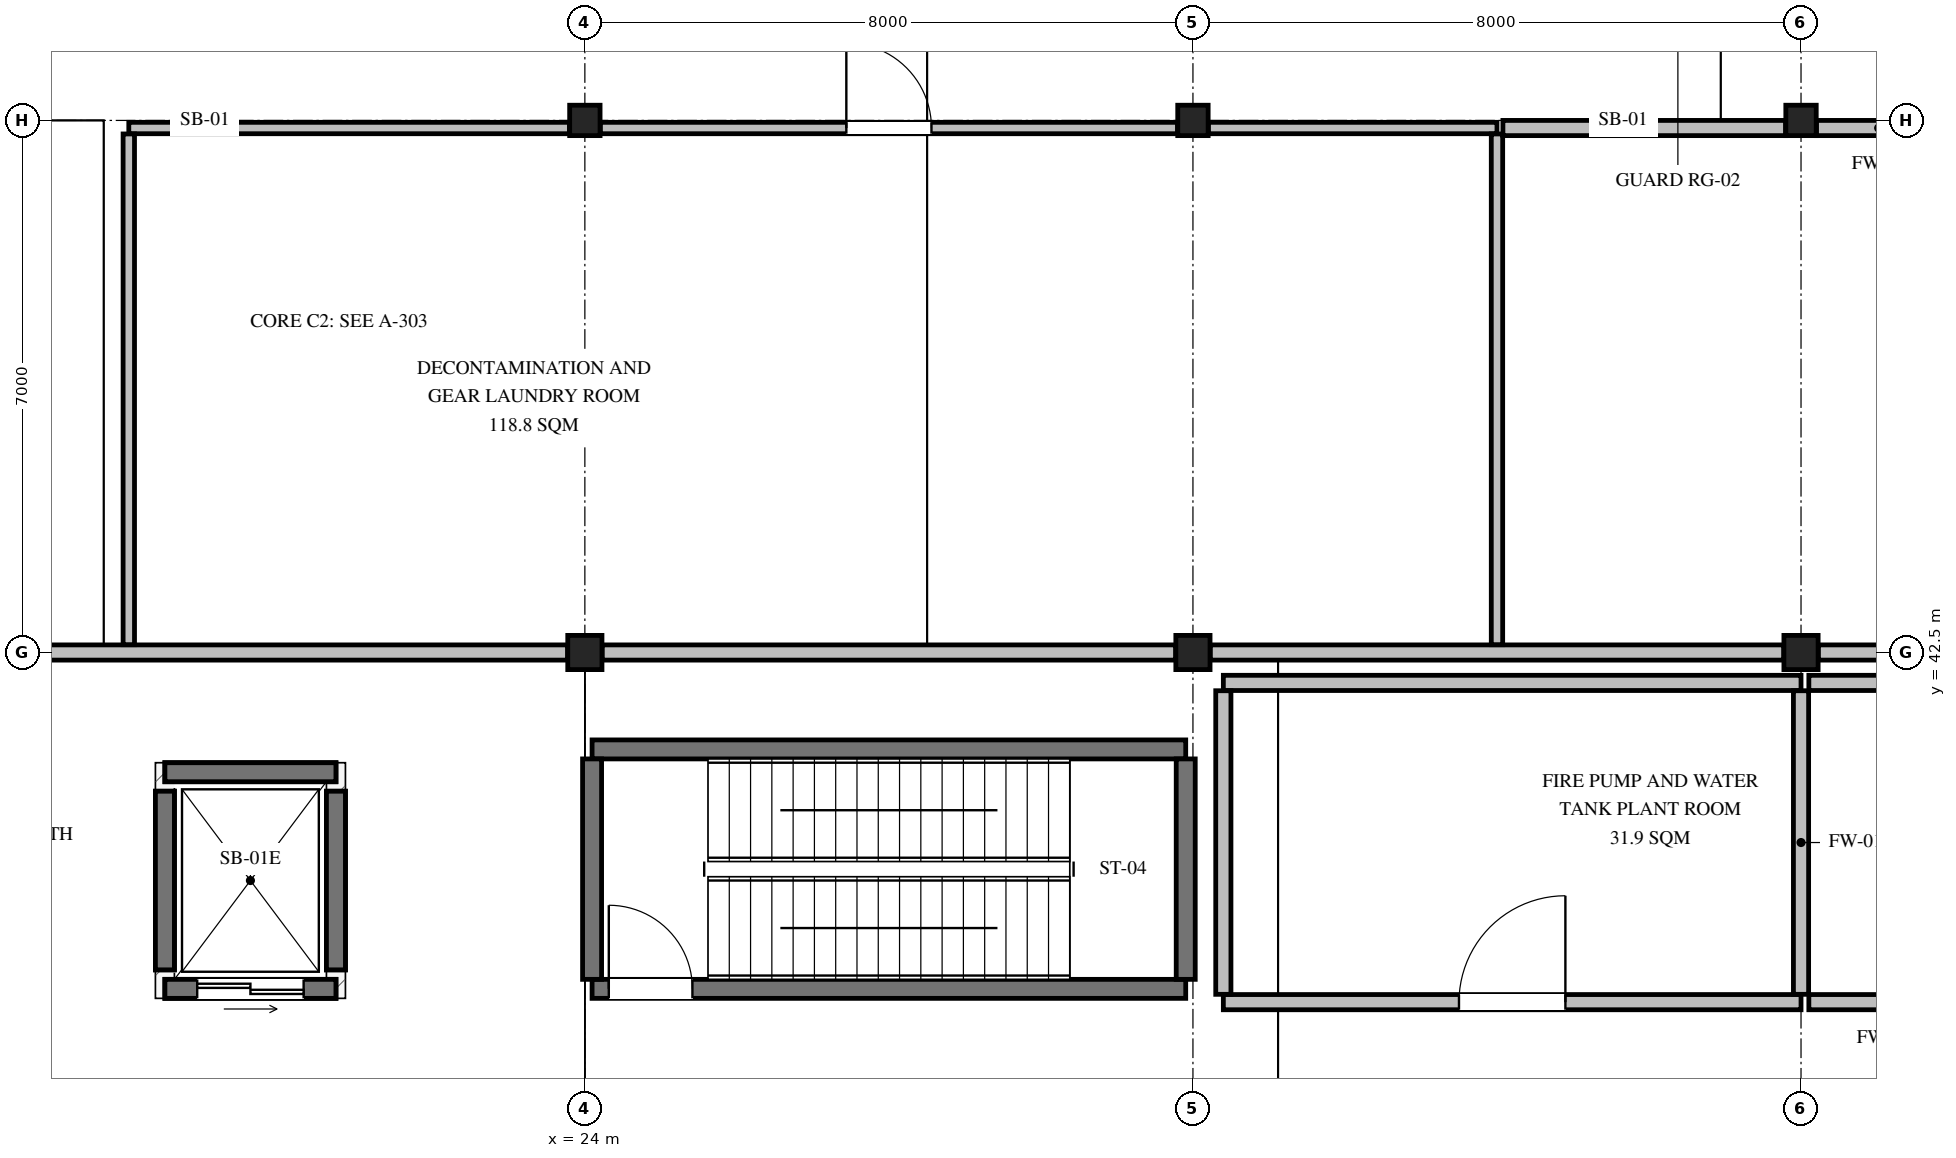
"""IFC4 building model, lengths in metres.
Left out: names, types, materials, properties, quantities, classifications, styles, units other than length and angle.
Written with IfcOpenShell. Run it as: python <this file> out.ifc"""

import sys

from ifc_helpers import new_model, si_unit, direction, frame, frame_2d, origin, origin_2d, place, context, subcontext, project, spatial, rectangle, hollow_rectangle, i_section, extrude, element, fill, save


model = new_model("IFC4")
c1 = context("Model", 3, precision=1e-05, world=origin(), true_north=direction((0.0, 1.0)))
c2 = subcontext(c1, "Body", "Model", "MODEL_VIEW")
j1 = project(units=[si_unit("LENGTHUNIT", "METRE"), si_unit("PLANEANGLEUNIT", "RADIAN")], contexts=[c1])
p1 = place(None, origin())
s1 = spatial("IfcSite", under=j1, at=p1, CompositionType="ELEMENT")
p2 = place(p1, origin())
s2 = spatial("IfcBuilding", under=s1, at=p2, CompositionType="ELEMENT")
p3 = place(p2, frame((0.0, 0.0, 0.45)))
s3 = spatial("IfcBuildingStorey", under=s2, at=p3, CompositionType="ELEMENT", Elevation=0.45)
p4 = place(p3, frame((24.0, 42.5, -0.45), z_axis=(0.0, 0.0, 1.0), x_axis=(1.0, 0.0, 0.0)))
e1 = element("IfcColumn", 1, at=p4, inside=s3, PredefinedType="COLUMN", context=c2, shape_type="SweptSolid", body=[
    extrude(hollow_rectangle(XDim=0.45, YDim=0.45, WallThickness=0.022, at=origin_2d()), origin(), (0.0, 0.0, 1.0), 5.85),
])
p5 = place(p3, frame((24.0, 49.5, -0.45), z_axis=(0.0, 0.0, 1.0), x_axis=(1.0, 0.0, 0.0)))
e2 = element("IfcColumn", 2, at=p5, inside=s3, PredefinedType="COLUMN", context=c2, shape_type="SweptSolid", body=[
    extrude(i_section(OverallWidth=0.4, OverallDepth=0.4, WebThickness=0.013, FlangeThickness=0.021, FilletRadius=0.022, at=origin_2d()), origin(), (0.0, 0.0, 1.0), 5.85),
])
p6 = place(p3, frame((32.0, 42.5, -0.45), z_axis=(0.0, 0.0, 1.0), x_axis=(1.0, 0.0, 0.0)))
e3 = element("IfcColumn", 3, at=p6, inside=s3, PredefinedType="COLUMN", context=c2, shape_type="SweptSolid", body=[
    extrude(hollow_rectangle(XDim=0.45, YDim=0.45, WallThickness=0.022, at=origin_2d()), origin(), (0.0, 0.0, 1.0), 5.85),
])
p7 = place(p3, frame((32.0, 49.5, -0.45), z_axis=(0.0, 0.0, 1.0), x_axis=(1.0, 0.0, 0.0)))
e4 = element("IfcColumn", 4, at=p7, inside=s3, PredefinedType="COLUMN", context=c2, shape_type="SweptSolid", body=[
    extrude(i_section(OverallWidth=0.4, OverallDepth=0.4, WebThickness=0.013, FlangeThickness=0.021, FilletRadius=0.022, at=origin_2d()), origin(), (0.0, 0.0, 1.0), 5.85),
])
p8 = place(p3, frame((40.0, 42.5, -0.45), z_axis=(0.0, 0.0, 1.0), x_axis=(1.0, 0.0, 0.0)))
e5 = element("IfcColumn", 5, at=p8, inside=s3, PredefinedType="COLUMN", context=c2, shape_type="SweptSolid", body=[
    extrude(hollow_rectangle(XDim=0.45, YDim=0.45, WallThickness=0.022, at=origin_2d()), origin(), (0.0, 0.0, 1.0), 5.85),
])
p9 = place(p3, frame((40.0, 49.5, -0.45), z_axis=(0.0, 0.0, 1.0), x_axis=(1.0, 0.0, 0.0)))
e6 = element("IfcColumn", 6, at=p9, inside=s3, PredefinedType="COLUMN", context=c2, shape_type="SweptSolid", body=[
    extrude(i_section(OverallWidth=0.4, OverallDepth=0.4, WebThickness=0.013, FlangeThickness=0.021, FilletRadius=0.022, at=origin_2d()), origin(), (0.0, 0.0, 1.0), 5.85),
])
p10 = place(p3, frame((24.095, 38.075, 0.0), z_axis=(0.0, 0.0, 1.0), x_axis=(1.0, 0.0, 0.0)))
e7 = element("IfcWall", 7, at=p10, inside=s3, PredefinedType="SHEAR", context=c2, shape_type="SweptSolid", body=[
    extrude(rectangle(XDim=7.81, YDim=0.25, at=frame_2d((3.905, 0.0))), origin(), (0.0, 0.0, 1.0), 5.16),
])
p11 = place(p10, frame((0.22, 0.0, 0.0)))
e8 = element("IfcOpeningElement", 8, at=p11, cuts=e7, PredefinedType="OPENING", context=c2, shape_type="SweptSolid", body=[
    extrude(rectangle(XDim=1.1, YDim=2.15, at=frame_2d((0.55, 1.075))), frame((0.0, 0.135, 0.0), z_axis=(0.0, -1.0, 0.0), x_axis=(1.0, 0.0, 0.0)), (0.0, 0.0, 1.0), 0.27),
])
p12 = place(p3, frame((24.095, 41.225, 0.0), z_axis=(0.0, 0.0, 1.0), x_axis=(1.0, 0.0, 0.0)))
e9 = element("IfcWall", 9, at=p12, inside=s3, PredefinedType="SHEAR", context=c2, shape_type="SweptSolid", body=[
    extrude(rectangle(XDim=7.81, YDim=0.25, at=frame_2d((3.905, 0.0))), origin(), (0.0, 0.0, 1.0), 5.16),
])
for number, where, z_axis, x_axis in (
    (10, (24.095, 38.2, 0.0), (0.0, 0.0, 1.0), (0.0, 1.0, 0.0)),
    (11, (31.905, 38.2, 0.0), (0.0, 0.0, 1.0), (0.0, 1.0, 0.0)),
):
    element("IfcWall", number, at=place(p3, frame(where, z_axis=z_axis, x_axis=x_axis)), inside=s3, PredefinedType="SHEAR", context=c2, shape_type="SweptSolid", body=[
        extrude(rectangle(XDim=2.9, YDim=0.25, at=frame_2d((1.45, 0.0))), origin(), (0.0, 0.0, 1.0), 5.16),
    ])
for number, where, z_axis, x_axis in (
    (12, (18.475, 38.075, -1.65), (0.0, 0.0, 1.0), (1.0, 0.0, 0.0)),
    (13, (18.475, 40.925, -1.65), (0.0, 0.0, 1.0), (1.0, 0.0, 0.0)),
):
    element("IfcWall", number, at=place(p3, frame(where, z_axis=z_axis, x_axis=x_axis)), inside=s3, PredefinedType="SHEAR", context=c2, shape_type="SweptSolid", body=[
        extrude(rectangle(XDim=2.25, YDim=0.25, at=frame_2d((1.125, 0.0))), origin(), (0.0, 0.0, 1.0), 1.65),
    ])
for number, where, z_axis, x_axis in (
    (14, (18.475, 38.325, -1.65), (0.0, 0.0, 1.0), (0.0, 1.0, 0.0)),
    (15, (20.725, 38.325, -1.65), (0.0, 0.0, 1.0), (0.0, 1.0, 0.0)),
):
    element("IfcWall", number, at=place(p3, frame(where, z_axis=z_axis, x_axis=x_axis)), inside=s3, PredefinedType="SHEAR", context=c2, shape_type="SweptSolid", body=[
        extrude(rectangle(XDim=2.35, YDim=0.25, at=frame_2d((1.175, 0.0))), origin(), (0.0, 0.0, 1.0), 1.65),
    ])
p13 = place(p3, frame((18.475, 38.075, 0.0), z_axis=(0.0, 0.0, 1.0), x_axis=(1.0, 0.0, 0.0)))
e16 = element("IfcWall", 16, at=p13, inside=s3, PredefinedType="SHEAR", context=c2, shape_type="SweptSolid", body=[
    extrude(rectangle(XDim=2.25, YDim=0.25, at=frame_2d((1.125, 0.0))), origin(), (0.0, 0.0, 1.0), 5.16),
])
p14 = place(p13, frame((0.425, 0.0, 0.0)))
e17 = element("IfcOpeningElement", 17, at=p14, cuts=e16, PredefinedType="OPENING", context=c2, shape_type="SweptSolid", body=[
    extrude(rectangle(XDim=1.4, YDim=2.2, at=frame_2d((0.7, 1.1))), frame((0.0, 0.135, 0.0), z_axis=(0.0, -1.0, 0.0), x_axis=(1.0, 0.0, 0.0)), (0.0, 0.0, 1.0), 0.27),
])
p15 = place(p3, frame((18.475, 40.925, 0.0), z_axis=(0.0, 0.0, 1.0), x_axis=(1.0, 0.0, 0.0)))
e18 = element("IfcWall", 18, at=p15, inside=s3, PredefinedType="SHEAR", context=c2, shape_type="SweptSolid", body=[
    extrude(rectangle(XDim=2.25, YDim=0.25, at=frame_2d((1.125, 0.0))), origin(), (0.0, 0.0, 1.0), 5.16),
])
for number, where, z_axis, x_axis in (
    (19, (18.475, 38.325, 0.0), (0.0, 0.0, 1.0), (0.0, 1.0, 0.0)),
    (20, (20.725, 38.325, 0.0), (0.0, 0.0, 1.0), (0.0, 1.0, 0.0)),
):
    element("IfcWall", number, at=place(p3, frame(where, z_axis=z_axis, x_axis=x_axis)), inside=s3, PredefinedType="SHEAR", context=c2, shape_type="SweptSolid", body=[
        extrude(rectangle(XDim=2.35, YDim=0.25, at=frame_2d((1.175, 0.0))), origin(), (0.0, 0.0, 1.0), 5.16),
    ])
p16 = place(p3, frame((16.227, 42.5, 0.0), z_axis=(0.0, 0.0, 1.0), x_axis=(1.0, 0.0, 0.0)))
e21 = element("IfcWall", 21, at=p16, inside=s3, PredefinedType="PARTITIONING", context=c2, shape_type="SweptSolid", body=[
    extrude(rectangle(XDim=7.546, YDim=0.2, at=frame_2d((3.773, 0.0))), origin(), (0.0, 0.0, 1.0), 4.654),
])
p17 = place(p3, frame((24.227, 42.5, 0.0), z_axis=(0.0, 0.0, 1.0), x_axis=(1.0, 0.0, 0.0)))
e22 = element("IfcWall", 22, at=p17, inside=s3, PredefinedType="PARTITIONING", context=c2, shape_type="SweptSolid", body=[
    extrude(rectangle(XDim=7.546, YDim=0.2, at=frame_2d((3.773, 0.0))), origin(), (0.0, 0.0, 1.0), 4.704),
])
p18 = place(p3, frame((32.227, 42.5, 0.0), z_axis=(0.0, 0.0, 1.0), x_axis=(1.0, 0.0, 0.0)))
e23 = element("IfcWall", 23, at=p18, inside=s3, PredefinedType="PARTITIONING", context=c2, shape_type="SweptSolid", body=[
    extrude(rectangle(XDim=7.546, YDim=0.2, at=frame_2d((3.773, 0.0))), origin(), (0.0, 0.0, 1.0), 4.654),
])
p19 = place(p3, frame((40.227, 42.5, 0.0), z_axis=(0.0, 0.0, 1.0), x_axis=(1.0, 0.0, 0.0)))
e24 = element("IfcWall", 24, at=p19, inside=s3, PredefinedType="PARTITIONING", context=c2, shape_type="SweptSolid", body=[
    extrude(rectangle(XDim=7.546, YDim=0.2, at=frame_2d((3.773, 0.0))), origin(), (0.0, 0.0, 1.0), 4.754),
])
p20 = place(p3, frame((32.4, 37.9, 0.0), z_axis=(0.0, 0.0, 1.0), x_axis=(1.0, 0.0, 0.0)))
e25 = element("IfcWall", 25, at=p20, inside=s3, PredefinedType="PARTITIONING", context=c2, shape_type="SweptSolid", body=[
    extrude(rectangle(XDim=7.6, YDim=0.2, at=frame_2d((3.8, 0.0))), origin(), (0.0, 0.0, 1.0), 5.16),
])
p21 = place(p20, frame((3.1, 0.0, 0.0)))
e26 = element("IfcOpeningElement", 26, at=p21, cuts=e25, PredefinedType="OPENING", context=c2, shape_type="SweptSolid", body=[
    extrude(rectangle(XDim=1.4, YDim=2.2, at=frame_2d((0.7, 1.1))), frame((0.0, 0.11, 0.0), z_axis=(0.0, -1.0, 0.0), x_axis=(1.0, 0.0, 0.0)), (0.0, 0.0, 1.0), 0.22),
])
p22 = place(p3, frame((32.4, 42.1, 0.0), z_axis=(0.0, 0.0, 1.0), x_axis=(1.0, 0.0, 0.0)))
e27 = element("IfcWall", 27, at=p22, inside=s3, PredefinedType="PARTITIONING", context=c2, shape_type="SweptSolid", body=[
    extrude(rectangle(XDim=7.6, YDim=0.2, at=frame_2d((3.8, 0.0))), origin(), (0.0, 0.0, 1.0), 5.16),
])
p23 = place(p3, frame((32.4, 38.003, 0.0), z_axis=(0.0, 0.0, 1.0), x_axis=(0.0, 1.0, 0.0)))
e28 = element("IfcWall", 28, at=p23, inside=s3, PredefinedType="PARTITIONING", context=c2, shape_type="SweptSolid", body=[
    extrude(rectangle(XDim=3.994, YDim=0.2, at=frame_2d((1.997, 0.0))), origin(), (0.0, 0.0, 1.0), 5.16),
])
p24 = place(p3, frame((40.0, 38.003, 0.0), z_axis=(0.0, 0.0, 1.0), x_axis=(0.0, 1.0, 0.0)))
e29 = element("IfcWall", 29, at=p24, inside=s3, PredefinedType="PARTITIONING", context=c2, shape_type="SweptSolid", body=[
    extrude(rectangle(XDim=3.994, YDim=0.2, at=frame_2d((1.997, 0.0))), origin(), (0.0, 0.0, 1.0), 4.714),
])
p25 = place(p3, frame((40.103, 37.9, 0.0), z_axis=(0.0, 0.0, 1.0), x_axis=(1.0, 0.0, 0.0)))
e30 = element("IfcWall", 30, at=p25, inside=s3, PredefinedType="PARTITIONING", context=c2, shape_type="SweptSolid", body=[
    extrude(rectangle(XDim=7.719, YDim=0.2, at=frame_2d((3.859, 0.0))), origin(), (0.0, 0.0, 1.0), 5.16),
])
p26 = place(p25, frame((3.159, 0.0, 0.0)))
e31 = element("IfcOpeningElement", 31, at=p26, cuts=e30, PredefinedType="OPENING", context=c2, shape_type="SweptSolid", body=[
    extrude(rectangle(XDim=1.4, YDim=2.2, at=frame_2d((0.7, 1.1))), frame((0.0, 0.11, 0.0), z_axis=(0.0, -1.0, 0.0), x_axis=(1.0, 0.0, 0.0)), (0.0, 0.0, 1.0), 0.22),
])
p27 = place(p3, frame((40.103, 42.1, 0.0), z_axis=(0.0, 0.0, 1.0), x_axis=(1.0, 0.0, 0.0)))
e32 = element("IfcWall", 32, at=p27, inside=s3, PredefinedType="PARTITIONING", context=c2, shape_type="SweptSolid", body=[
    extrude(rectangle(XDim=7.719, YDim=0.2, at=frame_2d((3.859, 0.0))), origin(), (0.0, 0.0, 1.0), 5.16),
])
p28 = place(p3, frame((18.0, 49.4, 0.0), z_axis=(0.0, 0.0, 1.0), x_axis=(1.0, 0.0, 0.0)))
e33 = element("IfcWall", 33, at=p28, inside=s3, PredefinedType="PARTITIONING", context=c2, shape_type="SweptSolid", body=[
    extrude(rectangle(XDim=5.797, YDim=0.15, at=frame_2d((2.898, 0.0))), origin(), (0.0, 0.0, 1.0), 4.544),
])
p29 = place(p3, frame((24.203, 49.4, 0.0), z_axis=(0.0, 0.0, 1.0), x_axis=(1.0, 0.0, 0.0)))
e34 = element("IfcWall", 34, at=p29, inside=s3, PredefinedType="PARTITIONING", context=c2, shape_type="SweptSolid", body=[
    extrude(rectangle(XDim=7.594, YDim=0.15, at=frame_2d((3.797, 0.0))), origin(), (0.0, 0.0, 1.0), 4.594),
])
p30 = place(p29, frame((3.237, 0.0, 0.0)))
e35 = element("IfcOpeningElement", 35, at=p30, cuts=e34, PredefinedType="OPENING", context=c2, shape_type="SweptSolid", body=[
    extrude(rectangle(XDim=1.12, YDim=2.1, at=frame_2d((0.56, 1.05))), frame((0.0, 0.085, 0.0), z_axis=(0.0, -1.0, 0.0), x_axis=(1.0, 0.0, 0.0)), (0.0, 0.0, 1.0), 0.17),
])
p31 = place(p3, frame((32.203, 49.4, 0.0), z_axis=(0.0, 0.0, 1.0), x_axis=(1.0, 0.0, 0.0)))
e36 = element("IfcWall", 36, at=p31, inside=s3, PredefinedType="PARTITIONING", context=c2, shape_type="SweptSolid", body=[
    extrude(rectangle(XDim=3.797, YDim=0.15, at=frame_2d((1.898, 0.0))), origin(), (0.0, 0.0, 1.0), 4.644),
])
p32 = place(p3, frame((18.0, 42.603, 0.0), z_axis=(0.0, 0.0, 1.0), x_axis=(0.0, 1.0, 0.0)))
e37 = element("IfcWall", 37, at=p32, inside=s3, PredefinedType="PARTITIONING", context=c2, shape_type="SweptSolid", body=[
    extrude(rectangle(XDim=6.719, YDim=0.15, at=frame_2d((3.359, 0.0))), origin(), (0.0, 0.0, 1.0), 5.2),
])
p33 = place(p3, frame((36.0, 42.603, 0.0), z_axis=(0.0, 0.0, 1.0), x_axis=(0.0, 1.0, 0.0)))
e38 = element("IfcWall", 38, at=p33, inside=s3, PredefinedType="PARTITIONING", context=c2, shape_type="SweptSolid", body=[
    extrude(rectangle(XDim=6.719, YDim=0.15, at=frame_2d((3.359, 0.0))), origin(), (0.0, 0.0, 1.0), 4.854),
])
p34 = place(p3, frame((36.078, 49.4, 0.0), z_axis=(0.0, 0.0, 1.0), x_axis=(1.0, 0.0, 0.0)))
e39 = element("IfcWall", 39, at=p34, inside=s3, PredefinedType="PARTITIONING", context=c2, shape_type="SweptSolid", body=[
    extrude(rectangle(XDim=3.719, YDim=0.2, at=frame_2d((1.86, 0.0))), origin(), (0.0, 0.0, 1.0), 4.644),
])
p35 = place(p3, frame((40.203, 49.4, 0.0), z_axis=(0.0, 0.0, 1.0), x_axis=(1.0, 0.0, 0.0)))
e40 = element("IfcWall", 40, at=p35, inside=s3, PredefinedType="PARTITIONING", context=c2, shape_type="SweptSolid", body=[
    extrude(rectangle(XDim=7.594, YDim=0.2, at=frame_2d((3.797, 0.0))), origin(), (0.0, 0.0, 1.0), 4.694),
])
p36 = place(p35, frame((2.997, 0.0, 0.0)))
e41 = element("IfcOpeningElement", 41, at=p36, cuts=e40, PredefinedType="OPENING", context=c2, shape_type="SweptSolid", body=[
    extrude(rectangle(XDim=1.6, YDim=2.2, at=frame_2d((0.8, 1.1))), frame((0.0, 0.11, 0.0), z_axis=(0.0, -1.0, 0.0), x_axis=(1.0, 0.0, 0.0)), (0.0, 0.0, 1.0), 0.22),
])
p37 = place(p11, frame((1.1, 0.0, 0.0), z_axis=(0.0, 0.0, 1.0), x_axis=(-1.0, 0.0, 0.0)))
e42 = element("IfcDoor", 42, at=p37, inside=s3, OperationType="SINGLE_SWING_LEFT", PredefinedType="DOOR", context=c2, shape_type="SweptSolid", body=[
    extrude(rectangle(XDim=1.1, YDim=2.15, at=frame_2d((0.55, 1.075))), frame((0.0, 0.025, 0.0), z_axis=(0.0, -1.0, 0.0), x_axis=(1.0, 0.0, 0.0)), (0.0, 0.0, 1.0), 0.05),
])
fill(e8, e42)
p38 = place(p14, origin())
e43 = element("IfcDoor", 43, at=p38, inside=s3, OperationType="DOUBLE_DOOR_SLIDING", PredefinedType="DOOR", context=c2, shape_type="SweptSolid", body=[
    extrude(rectangle(XDim=1.4, YDim=2.2, at=frame_2d((0.7, 1.1))), frame((0.0, 0.025, 0.0), z_axis=(0.0, -1.0, 0.0), x_axis=(1.0, 0.0, 0.0)), (0.0, 0.0, 1.0), 0.05),
])
fill(e17, e43)
p39 = place(p21, origin())
e44 = element("IfcDoor", 44, at=p39, inside=s3, OperationType="SINGLE_SWING_RIGHT", PredefinedType="DOOR", context=c2, shape_type="SweptSolid", body=[
    extrude(rectangle(XDim=1.4, YDim=2.2, at=frame_2d((0.7, 1.1))), frame((0.0, 0.025, 0.0), z_axis=(0.0, -1.0, 0.0), x_axis=(1.0, 0.0, 0.0)), (0.0, 0.0, 1.0), 0.05),
])
fill(e26, e44)
p40 = place(p30, origin())
e45 = element("IfcDoor", 45, at=p40, inside=s3, OperationType="SINGLE_SWING_LEFT", PredefinedType="DOOR", context=c2, shape_type="SweptSolid", body=[
    extrude(rectangle(XDim=1.12, YDim=2.1, at=frame_2d((0.56, 1.05))), frame((0.0, 0.025, 0.0), z_axis=(0.0, -1.0, 0.0), x_axis=(1.0, 0.0, 0.0)), (0.0, 0.0, 1.0), 0.05),
])
fill(e35, e45)
save(model, sys.argv[1])
